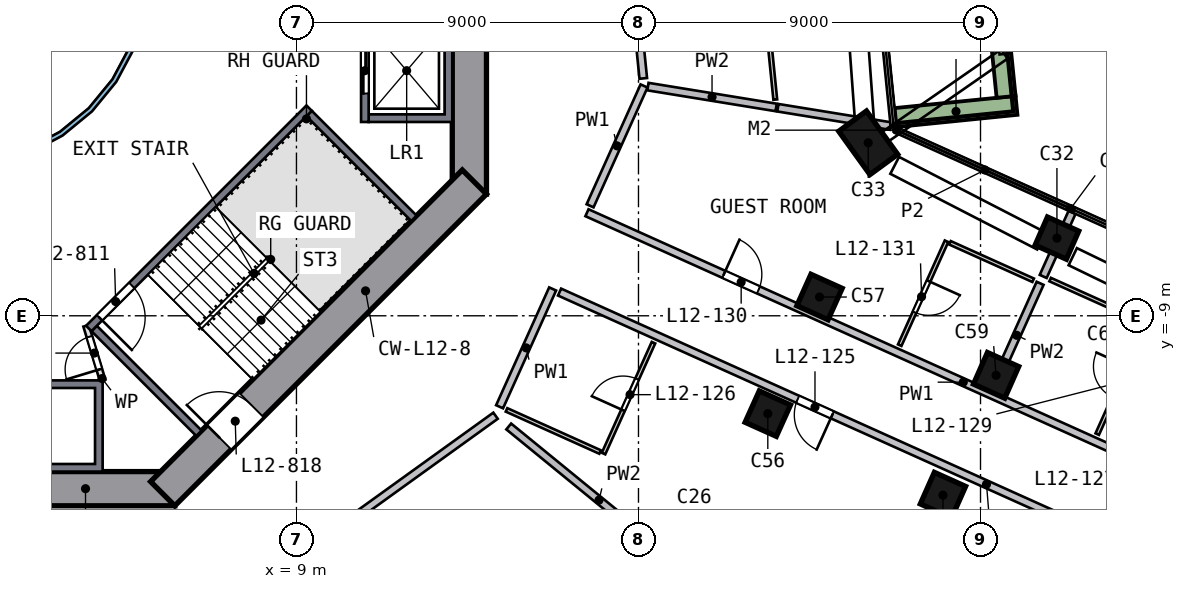
"""IFC4 building model, lengths in metres.
Left out: names, types, materials, properties, quantities, classifications, styles, units other than length and angle.
Written with IfcOpenShell. Run it as: python <this file> out.ifc"""

import sys

from ifc_helpers import new_model, si_unit, direction, frame, frame_2d, origin, origin_2d, place, context, subcontext, project, spatial, polyline, rectangle, outline, extrude, element, fill, save


model = new_model("IFC4")
c1 = context("Model", 3, precision=1e-05, world=origin(), true_north=direction((0.0, 1.0)))
c2 = subcontext(c1, "Body", "Model", "MODEL_VIEW")
j1 = project(units=[si_unit("LENGTHUNIT", "METRE"), si_unit("PLANEANGLEUNIT", "RADIAN")], contexts=[c1])
p1 = place(None, origin())
s1 = spatial("IfcSite", under=j1, at=p1, CompositionType="ELEMENT")
p2 = place(p1, origin())
s2 = spatial("IfcBuilding", under=s1, at=p2, CompositionType="ELEMENT")
p3 = place(p2, frame((0.0, 0.0, 56.5)))
s3 = spatial("IfcBuildingStorey", under=s2, at=p3, CompositionType="ELEMENT", Elevation=56.5)
p4 = place(p3, frame((29.019, -7.144, 0.0), z_axis=(-0.00688079, 0.154553138, 0.987960517), x_axis=(-0.913616839, 0.40067117, -0.06904263)))
e1 = element("IfcColumn", 1, at=p4, inside=s3, PredefinedType="COLUMN", context=c2, shape_type="SweptSolid", body=[
    extrude(rectangle(XDim=0.9, YDim=0.8, at=origin_2d()), origin(), (0.0, 0.0, 1.0), 3.229),
])
p5 = place(p3, frame((24.02, -4.586, 0.0), z_axis=(0.020828195, 0.114403043, 0.993216054), x_axis=(0.588137095, -0.804758769, 0.080362191)))
e2 = element("IfcColumn", 2, at=p5, inside=s3, PredefinedType="COLUMN", context=c2, shape_type="SweptSolid", body=[
    extrude(rectangle(XDim=1.4, YDim=0.9, at=origin_2d()), origin(), (0.0, 0.0, 1.0), 3.212),
])
for number, where, z_axis, x_axis in (
    (3, (21.337, -11.698, 0.0), (0.055, 0.102, 0.993), (0.911, -0.411, -0.008)),
    (4, (22.715, -8.637, 0.0), (0.04, 0.108, 0.993), (0.912, -0.41, 0.008)),
):
    element("IfcColumn", number, at=place(p3, frame(where, z_axis=z_axis, x_axis=x_axis)), inside=s3, PredefinedType="COLUMN", context=c2, shape_type="SweptSolid", body=[
        extrude(rectangle(XDim=0.9, YDim=0.9, at=origin_2d()), origin(), (0.0, 0.0, 1.0), 3.211),
    ])
p6 = place(p3, frame((25.981, -13.891, 0.0), z_axis=(0.0252244, 0.140665796, 0.989735754), x_axis=(0.913222788, -0.406003454, 0.034428687)))
e5 = element("IfcColumn", 5, at=p6, inside=s3, PredefinedType="COLUMN", context=c2, shape_type="SweptSolid", body=[
    extrude(rectangle(XDim=0.9, YDim=0.9, at=origin_2d()), origin(), (0.0, 0.0, 1.0), 3.223),
])
p7 = place(p3, frame((27.397, -10.746, 0.0), z_axis=(0.010294821, 0.147155386, 0.989059811), x_axis=(0.913414786, -0.403874809, 0.050582291)))
e6 = element("IfcColumn", 6, at=p7, inside=s3, PredefinedType="COLUMN", context=c2, shape_type="SweptSolid", body=[
    extrude(rectangle(XDim=0.9, YDim=0.9, at=origin_2d()), origin(), (0.0, 0.0, 1.0), 3.225),
])
p8 = place(p3, frame((13.55, -5.799, 0.0), z_axis=(0.0, 0.0, 1.0), x_axis=(0.0, 1.0, 0.0)))
e7 = element("IfcWall", 7, at=p8, inside=s3, PredefinedType="SHEAR", context=c2, shape_type="SweptSolid", body=[
    extrude(rectangle(XDim=11.598, YDim=0.9, at=frame_2d((5.799, 0.0))), origin(), (0.0, 0.0, 1.0), 3.5),
])
p9 = place(p8, frame((4.899, 0.0, 0.0)))
e8 = element("IfcOpeningElement", 8, at=p9, cuts=e7, PredefinedType="OPENING", context=c2, shape_type="SweptSolid", body=[
    extrude(rectangle(XDim=1.8, YDim=2.1, at=frame_2d((0.9, 1.05))), frame((0.0, 0.46, 0.0), z_axis=(0.0, -1.0, 0.0), x_axis=(1.0, 0.0, 0.0)), (0.0, 0.0, 1.0), 0.92),
])
p10 = place(p3, frame((-5.799, -13.55, 0.0), z_axis=(0.0, 0.0, 1.0), x_axis=(1.0, 0.0, 0.0)))
e9 = element("IfcWall", 9, at=p10, inside=s3, PredefinedType="SHEAR", context=c2, shape_type="SweptSolid", body=[
    extrude(rectangle(XDim=11.598, YDim=0.9, at=frame_2d((5.799, 0.0))), origin(), (0.0, 0.0, 1.0), 3.5),
])
p11 = place(p10, frame((4.899, 0.0, 0.0)))
e10 = element("IfcOpeningElement", 10, at=p11, cuts=e9, PredefinedType="OPENING", context=c2, shape_type="SweptSolid", body=[
    extrude(rectangle(XDim=1.8, YDim=2.1, at=frame_2d((0.9, 1.05))), frame((0.0, 0.46, 0.0), z_axis=(0.0, -1.0, 0.0), x_axis=(1.0, 0.0, 0.0)), (0.0, 0.0, 1.0), 0.92),
])
p12 = place(p3, frame((5.481, -13.682, 0.0), z_axis=(0.0, 0.0, 1.0), x_axis=(0.707106781, 0.707106781, 0.0)))
e11 = element("IfcWall", 11, at=p12, inside=s3, PredefinedType="SHEAR", context=c2, shape_type="SweptSolid", body=[
    extrude(rectangle(XDim=11.598, YDim=0.9, at=frame_2d((5.799, 0.0))), origin(), (0.0, 0.0, 1.0), 3.5),
])
p13 = place(p12, frame((2.099, 0.0, 0.0)))
e12 = element("IfcOpeningElement", 12, at=p13, cuts=e11, PredefinedType="OPENING", context=c2, shape_type="SweptSolid", body=[
    extrude(rectangle(XDim=1.2, YDim=2.1, at=frame_2d((0.6, 1.05))), frame((0.0, 0.46, 0.0), z_axis=(0.0, -1.0, 0.0), x_axis=(1.0, 0.0, 0.0)), (0.0, 0.0, 1.0), 0.92),
])
p14 = place(p3, frame((24.764, -3.784, 0.0), z_axis=(0.0, 0.0, 1.0), x_axis=(0.994951439, 0.100357532, 0.0)))
e13 = element("IfcWall", 13, at=p14, inside=s3, PredefinedType="SOLIDWALL", context=c2, shape_type="SweptSolid", body=[
    extrude(rectangle(XDim=3.199, YDim=0.5, at=frame_2d((1.6, 0.0))), origin(), (0.0, 0.0, 1.0), 0.7),
])
p15 = place(p3, frame((27.673, -3.239, 0.0), z_axis=(0.0, 0.0, 1.0), x_axis=(-0.100362834, 0.994950904, 0.0)))
e14 = element("IfcWall", 14, at=p15, inside=s3, PredefinedType="SOLIDWALL", context=c2, shape_type="SweptSolid", body=[
    extrude(rectangle(XDim=13.223, YDim=0.5, at=frame_2d((6.612, 0.0))), origin(), (0.0, 0.0, 1.0), 0.7),
])
p16 = place(p3, origin())
e15 = element("IfcWall", 15, at=p16, inside=s3, PredefinedType="SOLIDWALL", context=c2, shape_type="SweptSolid", body=[
    extrude(outline(polyline([(13.1, -3.9), (10.9, -3.9), (10.9, -3.7), (12.9, -3.7), (12.9, -1.4), (10.9, -1.4), (10.9, -1.2), (13.1, -1.2), (13.1, -3.9)])), origin(), (0.0, 0.0, 1.0), 3.19),
])
p17 = place(p3, frame((10.8, -1.2, 0.0), z_axis=(0.0, 0.0, 1.0), x_axis=(0.0, -1.0, 0.0)))
e16 = element("IfcWall", 16, at=p17, inside=s3, PredefinedType="SOLIDWALL", context=c2, shape_type="SweptSolid", body=[
    extrude(rectangle(XDim=2.7, YDim=0.2, at=frame_2d((1.35, 0.0))), origin(), (0.0, 0.0, 1.0), 3.19),
])
p18 = place(p17, frame((0.75, 0.0, 0.0)))
e17 = element("IfcOpeningElement", 17, at=p18, cuts=e16, PredefinedType="OPENING", context=c2, shape_type="SweptSolid", body=[
    extrude(rectangle(XDim=1.2, YDim=2.1, at=frame_2d((0.6, 1.05))), frame((0.0, 0.11, 0.0), z_axis=(0.0, -1.0, 0.0), x_axis=(1.0, 0.0, 0.0)), (0.0, 0.0, 1.0), 0.22),
])
p19 = place(p3, origin())
e18 = element("IfcWall", 18, at=p19, inside=s3, PredefinedType="SOLIDWALL", context=c2, shape_type="SweptSolid", body=[
    extrude(outline(polyline([(3.9, -10.7), (3.9, -13.1), (1.2, -13.1), (1.2, -10.7), (3.9, -10.7)]), holes=[polyline([(1.4, -12.9), (3.7, -12.9), (3.7, -10.9), (1.4, -10.9), (1.4, -12.9)])]), origin(), (0.0, 0.0, 1.0), 3.19),
])
p20 = place(p3, frame((9.334, -3.535, 0.0), z_axis=(0.0, 0.0, 1.0), x_axis=(-0.707106781, -0.707106781, 0.0)))
e19 = element("IfcWall", 19, at=p20, inside=s3, PredefinedType="SOLIDWALL", context=c2, shape_type="SweptSolid", body=[
    extrude(rectangle(XDim=8.2, YDim=0.2, at=frame_2d((4.1, 0.0))), origin(), (0.0, 0.0, 1.0), 3.19),
])
p21 = place(p20, frame((6.6, 0.0, 0.0)))
e20 = element("IfcOpeningElement", 20, at=p21, cuts=e19, PredefinedType="OPENING", context=c2, shape_type="SweptSolid", body=[
    extrude(rectangle(XDim=1.2, YDim=2.1, at=frame_2d((0.6, 1.05))), frame((0.0, 0.11, 0.0), z_axis=(0.0, -1.0, 0.0), x_axis=(1.0, 0.0, 0.0)), (0.0, 0.0, 1.0), 0.22),
])
for number, where, z_axis, x_axis in (
    (21, (3.677, -9.334, 0.0), (0.0, 0.0, 1.0), (0.707, -0.707, 0.0)),
    (22, (9.334, -3.677, 0.0), (0.0, 0.0, 1.0), (0.707, -0.707, 0.0)),
):
    element("IfcWall", number, at=place(p3, frame(where, z_axis=z_axis, x_axis=x_axis)), inside=s3, PredefinedType="SOLIDWALL", context=c2, shape_type="SweptSolid", body=[
        extrude(rectangle(XDim=3.9, YDim=0.2, at=frame_2d((1.95, 0.0))), origin(), (0.0, 0.0, 1.0), 3.19),
    ])
p22 = place(p3, frame((3.9, -10.7, 0.0), z_axis=(0.0, 0.0, 1.0), x_axis=(-0.289808785, 0.957084567, 0.0)))
e23 = element("IfcWall", 23, at=p22, inside=s3, PredefinedType="PARTITIONING", context=c2, shape_type="SweptSolid", body=[
    extrude(rectangle(XDim=1.501, YDim=0.15, at=frame_2d((0.75, 0.0))), origin(), (0.0, 0.0, 1.0), 3.19),
])
p23 = place(p22, frame((0.301, 0.0, 0.0)))
e24 = element("IfcOpeningElement", 24, at=p23, cuts=e23, PredefinedType="OPENING", context=c2, shape_type="SweptSolid", body=[
    extrude(rectangle(XDim=0.9, YDim=2.1, at=frame_2d((0.45, 1.05))), frame((0.0, 0.085, 0.0), z_axis=(0.0, -1.0, 0.0), x_axis=(1.0, 0.0, 0.0)), (0.0, 0.0, 1.0), 0.17),
])
p24 = place(p3, origin())
e25 = element("IfcWall", 25, at=p24, inside=s3, PredefinedType="SOLIDWALL", context=c2, shape_type="SweptSolid", body=[
    extrude(outline(polyline([(5.021, -0.999), (4.73, -1.959), (4.257, -2.844), (3.62, -3.62), (2.844, -4.257), (1.959, -4.73), (0.999, -5.021), (0.0, -5.12), (-0.999, -5.021), (-1.959, -4.73), (-2.844, -4.257), (-3.62, -3.62), (-4.257, -2.844), (-4.73, -1.959), (-5.021, -0.999), (-5.12, 0.0), (-5.021, 0.999), (-4.73, 1.959), (-4.257, 2.844), (-3.62, 3.62), (-2.844, 4.257), (-1.959, 4.73), (-0.999, 5.021), (0.0, 5.12), (0.999, 5.021), (1.959, 4.73), (2.844, 4.257), (3.62, 3.62), (4.257, 2.844), (4.73, 1.959), (5.021, 0.999), (5.12, 0.0), (5.021, -0.999)]), holes=[polyline([(4.904, 0.976), (4.619, 1.913), (4.157, 2.778), (3.535, 3.535), (2.778, 4.157), (1.913, 4.619), (0.976, 4.904), (0.0, 5.0), (-0.976, 4.904), (-1.913, 4.619), (-2.778, 4.157), (-3.535, 3.535), (-4.157, 2.778), (-4.619, 1.913), (-4.904, 0.976), (-5.0, 0.0), (-4.904, -0.976), (-4.619, -1.913), (-4.157, -2.778), (-3.535, -3.535), (-2.778, -4.157), (-1.913, -4.619), (-0.976, -4.904), (0.0, -5.0), (0.976, -4.904), (1.913, -4.619), (2.778, -4.157), (3.535, -3.535), (4.157, -2.778), (4.619, -1.913), (4.904, -0.976), (5.0, 0.0), (4.904, 0.976)])]), origin(), (0.0, 0.0, 1.0), 3.19),
])
p25 = place(p3, frame((6.517, -17.191, 0.0), z_axis=(0.0, 0.0, 1.0), x_axis=(0.811459882, 0.584408127, 0.0)))
e26 = element("IfcWall", 26, at=p25, inside=s3, PredefinedType="SOLIDWALL", context=c2, shape_type="SweptSolid", body=[
    extrude(rectangle(XDim=9.516, YDim=0.2, at=frame_2d((4.758, 0.0))), origin(), (0.0, 0.0, 1.0), 3.19),
])
p26 = place(p3, frame((14.345, -11.394, 0.0), z_axis=(0.0, 0.0, 1.0), x_axis=(0.41053785, 0.911843558, 0.0)))
e27 = element("IfcWall", 27, at=p26, inside=s3, PredefinedType="SOLIDWALL", context=c2, shape_type="SweptSolid", body=[
    extrude(rectangle(XDim=3.4, YDim=0.2, at=frame_2d((1.7, 0.0))), origin(), (0.0, 0.0, 1.0), 3.19),
])
p27 = place(p3, frame((16.726, -6.105, 0.0), z_axis=(0.0, 0.0, 1.0), x_axis=(0.410561327, 0.911832988, 0.0)))
e28 = element("IfcWall", 28, at=p27, inside=s3, PredefinedType="SOLIDWALL", context=c2, shape_type="SweptSolid", body=[
    extrude(rectangle(XDim=3.458, YDim=0.2, at=frame_2d((1.729, 0.0))), origin(), (0.0, 0.0, 1.0), 3.19),
])
p28 = place(p3, frame((17.191, 6.517, 0.0), z_axis=(0.0, 0.0, 1.0), x_axis=(0.100362456, -0.994950942, 0.0)))
e29 = element("IfcWall", 29, at=p28, inside=s3, PredefinedType="SOLIDWALL", context=c2, shape_type="SweptSolid", body=[
    extrude(rectangle(XDim=9.317, YDim=0.2, at=frame_2d((4.658, 0.0))), origin(), (0.0, 0.0, 1.0), 3.19),
])
p29 = place(p28, frame((1.9, 0.0, 0.0)))
e30 = element("IfcOpeningElement", 30, at=p29, cuts=e29, PredefinedType="OPENING", context=c2, shape_type="SweptSolid", body=[
    extrude(rectangle(XDim=1.0, YDim=2.1, at=frame_2d((0.5, 1.05))), frame((0.0, 0.11, 0.0), z_axis=(0.0, -1.0, 0.0), x_axis=(1.0, 0.0, 0.0)), (0.0, 0.0, 1.0), 0.22),
])
p30 = place(p3, frame((31.033, -15.179, 0.0), z_axis=(0.0, 0.0, 1.0), x_axis=(-0.911836027, 0.410554576, 0.0)))
e31 = element("IfcWall", 31, at=p30, inside=s3, PredefinedType="SOLIDWALL", context=c2, shape_type="SweptSolid", body=[
    extrude(rectangle(XDim=16.571, YDim=0.2, at=frame_2d((8.285, 0.0))), origin(), (0.0, 0.0, 1.0), 3.19),
])
p31 = place(p30, frame((8.7, 0.0, 0.0)))
e32 = element("IfcOpeningElement", 32, at=p31, cuts=e31, PredefinedType="OPENING", context=c2, shape_type="SweptSolid", body=[
    extrude(rectangle(XDim=1.0, YDim=2.1, at=frame_2d((0.5, 1.05))), frame((0.0, 0.11, 0.0), z_axis=(0.0, -1.0, 0.0), x_axis=(1.0, 0.0, 0.0)), (0.0, 0.0, 1.0), 0.22),
])
p32 = place(p3, frame((16.644, -6.288, 0.0), z_axis=(0.0, 0.0, 1.0), x_axis=(0.911830511, -0.410566826, 0.0)))
e33 = element("IfcWall", 33, at=p32, inside=s3, PredefinedType="SOLIDWALL", context=c2, shape_type="SweptSolid", body=[
    extrude(rectangle(XDim=16.571, YDim=0.2, at=frame_2d((8.285, 0.0))), origin(), (0.0, 0.0, 1.0), 3.19),
])
p33 = place(p32, frame((3.95, 0.0, 0.0)))
e34 = element("IfcOpeningElement", 34, at=p33, cuts=e33, PredefinedType="OPENING", context=c2, shape_type="SweptSolid", body=[
    extrude(rectangle(XDim=1.0, YDim=2.1, at=frame_2d((0.5, 1.05))), frame((0.0, 0.11, 0.0), z_axis=(0.0, -1.0, 0.0), x_axis=(1.0, 0.0, 0.0)), (0.0, 0.0, 1.0), 0.22),
])
p34 = place(p3, frame((14.585, -11.913, 0.0), z_axis=(0.0, 0.0, 1.0), x_axis=(0.774505144, -0.632567611, 0.0)))
e35 = element("IfcWall", 35, at=p34, inside=s3, PredefinedType="SOLIDWALL", context=c2, shape_type="SweptSolid", body=[
    extrude(rectangle(XDim=6.132, YDim=0.2, at=frame_2d((3.066, 0.0))), origin(), (0.0, 0.0, 1.0), 3.19),
])
p35 = place(p3, frame((18.248, -2.969, 0.0), z_axis=(0.0, 0.0, 1.0), x_axis=(0.987029122, -0.160541311, 0.0)))
e36 = element("IfcWall", 36, at=p35, inside=s3, PredefinedType="SOLIDWALL", context=c2, shape_type="SweptSolid", body=[
    extrude(rectangle(XDim=3.419, YDim=0.2, at=frame_2d((1.709, 0.0))), origin(), (0.0, 0.0, 1.0), 3.19),
])
p36 = place(p3, frame((21.668, -3.525, 0.0), z_axis=(0.0, 0.0, 1.0), x_axis=(0.987019825, -0.160598462, 0.0)))
e37 = element("IfcWall", 37, at=p36, inside=s3, PredefinedType="SOLIDWALL", context=c2, shape_type="SweptSolid", body=[
    extrude(rectangle(XDim=3.011, YDim=0.2, at=frame_2d((1.506, 0.0))), origin(), (0.0, 0.0, 1.0), 3.19),
])
p37 = place(p3, frame((27.336, -10.883, 0.0), z_axis=(0.0, 0.0, 1.0), x_axis=(0.410540513, 0.911842359, 0.0)))
e38 = element("IfcWall", 38, at=p37, inside=s3, PredefinedType="SOLIDWALL", context=c2, shape_type="SweptSolid", body=[
    extrude(rectangle(XDim=3.002, YDim=0.2, at=frame_2d((1.501, 0.0))), origin(), (0.0, 0.0, 1.0), 3.19),
])
p38 = place(p3, frame((28.65, -7.965, 0.0), z_axis=(0.0, 0.0, 1.0), x_axis=(0.410529278, 0.911847417, 0.0)))
e39 = element("IfcWall", 39, at=p38, inside=s3, PredefinedType="SOLIDWALL", context=c2, shape_type="SweptSolid", body=[
    extrude(rectangle(XDim=1.85, YDim=0.2, at=frame_2d((0.925, 0.0))), origin(), (0.0, 0.0, 1.0), 3.19),
])
p39 = place(p3, frame((16.99, -12.585, 0.0), z_axis=(0.0, 0.0, 1.0), x_axis=(-0.911847045, 0.410530105, 0.0)))
e40 = element("IfcWall", 40, at=p39, inside=s3, PredefinedType="PARTITIONING", context=c2, shape_type="SweptSolid", body=[
    extrude(rectangle(XDim=2.7, YDim=0.1, at=frame_2d((1.35, 0.0))), origin(), (0.0, 0.0, 1.0), 3.19),
])
p40 = place(p3, frame((17.081, -12.626, 0.0), z_axis=(0.0, 0.0, 1.0), x_axis=(0.410558188, 0.911834401, 0.0)))
e41 = element("IfcWall", 41, at=p40, inside=s3, PredefinedType="PARTITIONING", context=c2, shape_type="SweptSolid", body=[
    extrude(rectangle(XDim=3.2, YDim=0.1, at=frame_2d((1.6, 0.0))), origin(), (0.0, 0.0, 1.0), 3.19),
])
p41 = place(p40, frame((1.25, 0.0, 0.0)))
e42 = element("IfcOpeningElement", 42, at=p41, cuts=e41, PredefinedType="OPENING", context=c2, shape_type="SweptSolid", body=[
    extrude(rectangle(XDim=0.9, YDim=2.1, at=frame_2d((0.45, 1.05))), frame((0.0, 0.06, 0.0), z_axis=(0.0, -1.0, 0.0), x_axis=(1.0, 0.0, 0.0)), (0.0, 0.0, 1.0), 0.12),
])
p42 = place(p3, frame((21.6, -3.311, 0.0), z_axis=(0.0, 0.0, 1.0), x_axis=(-0.100319439, 0.99495528, 0.0)))
e43 = element("IfcWall", 43, at=p42, inside=s3, PredefinedType="PARTITIONING", context=c2, shape_type="SweptSolid", body=[
    extrude(rectangle(XDim=3.704, YDim=0.1, at=frame_2d((1.852, 0.0))), origin(), (0.0, 0.0, 1.0), 3.19),
])
p43 = place(p3, frame((26.106, -7.039, 0.0), z_axis=(0.0, 0.0, 1.0), x_axis=(-0.410581238, -0.911824022, 0.0)))
e44 = element("IfcWall", 44, at=p43, inside=s3, PredefinedType="PARTITIONING", context=c2, shape_type="SweptSolid", body=[
    extrude(rectangle(XDim=3.0, YDim=0.1, at=frame_2d((1.5, 0.0))), origin(), (0.0, 0.0, 1.0), 3.19),
])
p44 = place(p43, frame((1.15, 0.0, 0.0)))
e45 = element("IfcOpeningElement", 45, at=p44, cuts=e44, PredefinedType="OPENING", context=c2, shape_type="SweptSolid", body=[
    extrude(rectangle(XDim=0.9, YDim=2.1, at=frame_2d((0.45, 1.05))), frame((0.0, 0.06, 0.0), z_axis=(0.0, -1.0, 0.0), x_axis=(1.0, 0.0, 0.0)), (0.0, 0.0, 1.0), 0.12),
])
p45 = place(p3, frame((26.197, -7.08, 0.0), z_axis=(0.0, 0.0, 1.0), x_axis=(0.91183774, -0.410550772, 0.0)))
e46 = element("IfcWall", 46, at=p45, inside=s3, PredefinedType="PARTITIONING", context=c2, shape_type="SweptSolid", body=[
    extrude(rectangle(XDim=2.4, YDim=0.1, at=frame_2d((1.2, 0.0))), origin(), (0.0, 0.0, 1.0), 3.19),
])
p46 = place(p3, frame((31.294, -9.155, 0.0), z_axis=(0.0, 0.0, 1.0), x_axis=(-0.911813193, 0.410605286, 0.0)))
e47 = element("IfcWall", 47, at=p46, inside=s3, PredefinedType="PARTITIONING", context=c2, shape_type="SweptSolid", body=[
    extrude(rectangle(XDim=2.7, YDim=0.1, at=frame_2d((1.35, 0.0))), origin(), (0.0, 0.0, 1.0), 3.19),
])
p47 = place(p3, frame((30.071, -12.114, 0.0), z_axis=(0.0, 0.0, 1.0), x_axis=(0.410593059, 0.911818699, 0.0)))
e48 = element("IfcWall", 48, at=p47, inside=s3, PredefinedType="PARTITIONING", context=c2, shape_type="SweptSolid", body=[
    extrude(rectangle(XDim=3.2, YDim=0.1, at=frame_2d((1.6, 0.0))), origin(), (0.0, 0.0, 1.0), 3.19),
])
p48 = place(p47, frame((1.05, 0.0, 0.0)))
e49 = element("IfcOpeningElement", 49, at=p48, cuts=e48, PredefinedType="OPENING", context=c2, shape_type="SweptSolid", body=[
    extrude(rectangle(XDim=0.9, YDim=2.1, at=frame_2d((0.45, 1.05))), frame((0.0, 0.06, 0.0), z_axis=(0.0, -1.0, 0.0), x_axis=(1.0, 0.0, 0.0)), (0.0, 0.0, 1.0), 0.12),
])
p49 = place(p18, origin())
e50 = element("IfcDoor", 50, at=p49, inside=s3, OperationType="DOUBLE_DOOR_SLIDING", PredefinedType="DOOR", context=c2, shape_type="SweptSolid", body=[
    extrude(rectangle(XDim=1.2, YDim=2.1, at=frame_2d((0.6, 1.05))), frame((0.0, 0.025, 0.0), z_axis=(0.0, -1.0, 0.0), x_axis=(1.0, 0.0, 0.0)), (0.0, 0.0, 1.0), 0.05),
])
fill(e17, e50)
p50 = place(p21, origin())
e51 = element("IfcDoor", 51, at=p50, inside=s3, OperationType="SINGLE_SWING_RIGHT", PredefinedType="DOOR", context=c2, shape_type="SweptSolid", body=[
    extrude(rectangle(XDim=1.2, YDim=2.1, at=frame_2d((0.6, 1.05))), frame((0.0, 0.025, 0.0), z_axis=(0.0, -1.0, 0.0), x_axis=(1.0, 0.0, 0.0)), (0.0, 0.0, 1.0), 0.05),
])
fill(e20, e51)
p51 = place(p13, origin())
e52 = element("IfcDoor", 52, at=p51, inside=s3, OperationType="SINGLE_SWING_LEFT", PredefinedType="DOOR", context=c2, shape_type="SweptSolid", body=[
    extrude(rectangle(XDim=1.2, YDim=2.1, at=frame_2d((0.6, 1.05))), frame((0.0, 0.025, 0.0), z_axis=(0.0, -1.0, 0.0), x_axis=(1.0, 0.0, 0.0)), (0.0, 0.0, 1.0), 0.05),
])
fill(e12, e52)
p52 = place(p23, origin())
e53 = element("IfcDoor", 53, at=p52, inside=s3, OperationType="SINGLE_SWING_LEFT", PredefinedType="DOOR", context=c2, shape_type="SweptSolid", body=[
    extrude(rectangle(XDim=0.9, YDim=2.1, at=frame_2d((0.45, 1.05))), frame((0.0, 0.025, 0.0), z_axis=(0.0, -1.0, 0.0), x_axis=(1.0, 0.0, 0.0)), (0.0, 0.0, 1.0), 0.05),
])
fill(e24, e53)
p53 = place(p31, origin())
e54 = element("IfcDoor", 54, at=p53, inside=s3, OperationType="SINGLE_SWING_LEFT", PredefinedType="DOOR", context=c2, shape_type="SweptSolid", body=[
    extrude(rectangle(XDim=1.0, YDim=2.1, at=frame_2d((0.5, 1.05))), frame((0.0, 0.025, 0.0), z_axis=(0.0, -1.0, 0.0), x_axis=(1.0, 0.0, 0.0)), (0.0, 0.0, 1.0), 0.05),
])
fill(e32, e54)
p54 = place(p41, origin())
e55 = element("IfcDoor", 55, at=p54, inside=s3, OperationType="SINGLE_SWING_LEFT", PredefinedType="DOOR", context=c2, shape_type="SweptSolid", body=[
    extrude(rectangle(XDim=0.9, YDim=2.1, at=frame_2d((0.45, 1.05))), frame((0.0, 0.025, 0.0), z_axis=(0.0, -1.0, 0.0), x_axis=(1.0, 0.0, 0.0)), (0.0, 0.0, 1.0), 0.05),
])
fill(e42, e55)
p55 = place(p33, origin())
e56 = element("IfcDoor", 56, at=p55, inside=s3, OperationType="SINGLE_SWING_LEFT", PredefinedType="DOOR", context=c2, shape_type="SweptSolid", body=[
    extrude(rectangle(XDim=1.0, YDim=2.1, at=frame_2d((0.5, 1.05))), frame((0.0, 0.025, 0.0), z_axis=(0.0, -1.0, 0.0), x_axis=(1.0, 0.0, 0.0)), (0.0, 0.0, 1.0), 0.05),
])
fill(e34, e56)
p56 = place(p44, origin())
e57 = element("IfcDoor", 57, at=p56, inside=s3, OperationType="SINGLE_SWING_LEFT", PredefinedType="DOOR", context=c2, shape_type="SweptSolid", body=[
    extrude(rectangle(XDim=0.9, YDim=2.1, at=frame_2d((0.45, 1.05))), frame((0.0, 0.025, 0.0), z_axis=(0.0, -1.0, 0.0), x_axis=(1.0, 0.0, 0.0)), (0.0, 0.0, 1.0), 0.05),
])
fill(e45, e57)
save(model, sys.argv[1])
